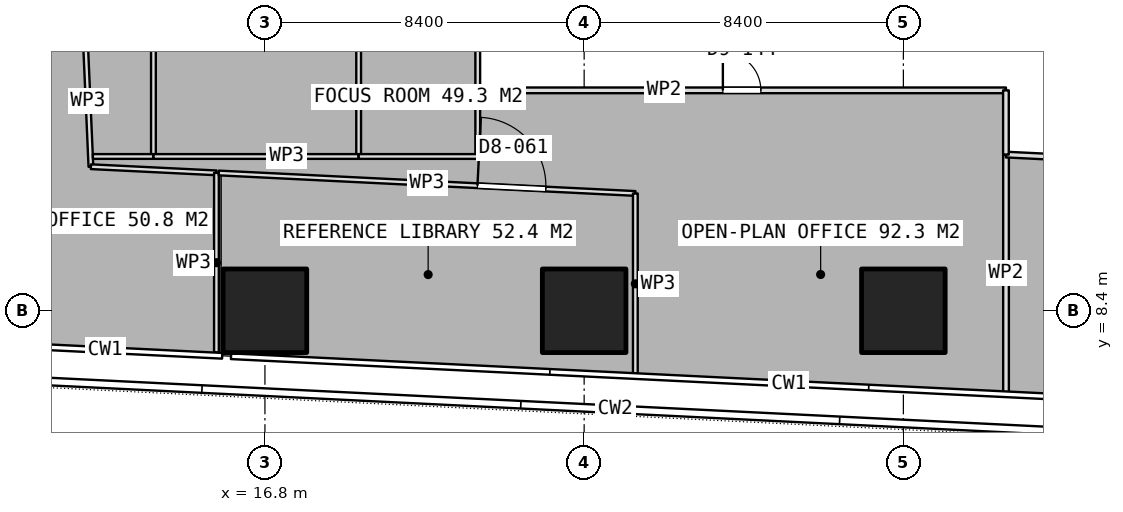
"""IFC4 building model, lengths in metres.
Left out: names, types, materials, properties, quantities, classifications, styles, units other than length and angle.
Written with IfcOpenShell. Run it as: python <this file> out.ifc"""

import sys

from ifc_helpers import new_model, si_unit, direction, frame, frame_2d, origin, origin_2d, place, context, subcontext, project, spatial, rectangle, extrude, element, fill, save


model = new_model("IFC4")
c1 = context("Model", 3, precision=1e-05, world=origin(), true_north=direction((0.0, 1.0)))
c2 = subcontext(c1, "Body", "Model", "MODEL_VIEW")
j1 = project(units=[si_unit("LENGTHUNIT", "METRE"), si_unit("PLANEANGLEUNIT", "RADIAN")], contexts=[c1])
p1 = place(None, origin())
s1 = spatial("IfcSite", under=j1, at=p1, CompositionType="ELEMENT")
p2 = place(p1, origin())
s2 = spatial("IfcBuilding", under=s1, at=p2, CompositionType="ELEMENT")
p3 = place(p2, frame((0.0, 0.0, 51.65)))
s3 = spatial("IfcBuildingStorey", under=s2, at=p3, CompositionType="ELEMENT", Elevation=51.65)
for number, where, z_axis, x_axis in (
    (1, (16.8, 8.4, 0.0), (0.0, 0.0, 1.0), (1.0, 0.0, 0.0)),
    (2, (25.2, 8.4, 0.0), (0.0, 0.0, 1.0), (1.0, 0.0, 0.0)),
    (3, (33.6, 8.4, 0.0), (0.0, 0.0, 1.0), (1.0, 0.0, 0.0)),
):
    element("IfcColumn", number, at=place(p3, frame(where, z_axis=z_axis, x_axis=x_axis)), inside=s3, PredefinedType="COLUMN", context=c2, shape_type="SweptSolid", body=[
        extrude(rectangle(XDim=2.2, YDim=2.2, at=origin_2d()), origin(), (0.0, 0.0, 1.0), 3.75),
    ])
p4 = place(p3, frame((36.301, 6.253, 0.0), z_axis=(0.0, 0.0, 1.0), x_axis=(0.0, 1.0, 0.0)))
e4 = element("IfcWall", 4, at=p4, inside=s3, PredefinedType="PARTITIONING", context=c2, shape_type="SweptSolid", body=[
    extrude(rectangle(XDim=6.257, YDim=0.15, at=frame_2d((3.128, 0.0))), origin(), (0.0, 0.0, 1.0), 3.5),
])
p5 = place(p3, frame((36.301, 12.51, 0.0), z_axis=(0.0, 0.0, 1.0), x_axis=(0.998801323594, -0.048948094823, 0.0)))
e5 = element("IfcWall", 5, at=p5, inside=s3, PredefinedType="PARTITIONING", context=c2, shape_type="SweptSolid", body=[
    extrude(rectangle(XDim=3.003, YDim=0.15, at=frame_2d((1.501, 0.0))), origin(), (0.0, 0.0, 1.0), 3.5),
])
p6 = place(p3, frame((12.07, 15.643, 0.0), z_axis=(0.0, 0.0, 1.0), x_axis=(0.043664115519, -0.999046267705, 0.0)))
e6 = element("IfcWall", 6, at=p6, inside=s3, PredefinedType="PARTITIONING", context=c2, shape_type="SweptSolid", body=[
    extrude(rectangle(XDim=3.455, YDim=0.125, at=frame_2d((1.728, 0.0))), origin(), (0.0, 0.0, 1.0), 3.5),
])
p7 = place(p3, frame((12.221, 12.191, 0.0), z_axis=(0.0, 0.0, 1.0), x_axis=(0.998801372368, -0.048947099555, 0.0)))
e7 = element("IfcWall", 7, at=p7, inside=s3, PredefinedType="PARTITIONING", context=c2, shape_type="SweptSolid", body=[
    extrude(rectangle(XDim=3.307, YDim=0.125, at=frame_2d((1.653, 0.0))), origin(), (0.0, 0.0, 1.0), 3.5),
])
p8 = place(p3, frame((15.524, 12.029, 0.0), z_axis=(0.0, 0.0, 1.0), x_axis=(0.0, -1.0, 0.0)))
e8 = element("IfcWall", 8, at=p8, inside=s3, PredefinedType="PARTITIONING", context=c2, shape_type="SweptSolid", body=[
    extrude(rectangle(XDim=4.726, YDim=0.125, at=frame_2d((2.363, 0.0))), origin(), (0.0, 0.0, 1.0), 3.5),
])
p9 = place(p3, frame((15.586, 12.026, 0.0), z_axis=(0.0, 0.0, 1.0), x_axis=(0.998793981911, -0.04909767508, 0.0)))
e9 = element("IfcWall", 9, at=p9, inside=s3, PredefinedType="PARTITIONING", context=c2, shape_type="SweptSolid", body=[
    extrude(rectangle(XDim=10.974, YDim=0.125, at=frame_2d((5.487, 0.0))), origin(), (0.0, 0.0, 1.0), 3.5),
])
p10 = place(p9, frame((6.815, 0.0, 0.0)))
e10 = element("IfcOpeningElement", 10, at=p10, cuts=e9, PredefinedType="OPENING", context=c2, shape_type="SweptSolid", body=[
    extrude(rectangle(XDim=1.8, YDim=2.1, at=frame_2d((0.9, 1.05))), frame((0.0, 0.073, 0.0), z_axis=(0.0, -1.0, 0.0), x_axis=(1.0, 0.0, 0.0)), (0.0, 0.0, 1.0), 0.145),
])
p11 = place(p3, frame((26.547, 11.487, 0.0), z_axis=(0.0, 0.0, 1.0), x_axis=(0.0, -1.0, 0.0)))
e11 = element("IfcWall", 11, at=p11, inside=s3, PredefinedType="PARTITIONING", context=c2, shape_type="SweptSolid", body=[
    extrude(rectangle(XDim=4.755, YDim=0.125, at=frame_2d((2.377, 0.0))), origin(), (0.0, 0.0, 1.0), 3.5),
])
p12 = place(p3, frame((13.866, 28.2, 0.0), z_axis=(0.0, 0.0, 1.0), x_axis=(0.0, -1.0, 0.0)))
e12 = element("IfcWall", 12, at=p12, inside=s3, PredefinedType="PARTITIONING", context=c2, shape_type="SweptSolid", body=[
    extrude(rectangle(XDim=15.74, YDim=0.125, at=frame_2d((7.87, 0.0))), origin(), (0.0, 0.0, 1.0), 3.5),
])
p13 = place(p3, frame((13.866, 12.46, 0.0), z_axis=(0.0, 0.0, 1.0), x_axis=(-1.0, 0.0, 0.0)))
e13 = element("IfcWall", 13, at=p13, inside=s3, PredefinedType="PARTITIONING", context=c2, shape_type="SweptSolid", body=[
    extrude(rectangle(XDim=1.594, YDim=0.125, at=frame_2d((0.797, 0.0))), origin(), (0.0, 0.0, 1.0), 3.5),
])
p14 = place(p3, frame((19.266, 28.2, 0.0), z_axis=(0.0, 0.0, 1.0), x_axis=(0.0, -1.0, 0.0)))
e14 = element("IfcWall", 14, at=p14, inside=s3, PredefinedType="PARTITIONING", context=c2, shape_type="SweptSolid", body=[
    extrude(rectangle(XDim=15.74, YDim=0.125, at=frame_2d((7.87, 0.0))), origin(), (0.0, 0.0, 1.0), 3.5),
])
p15 = place(p3, frame((19.266, 12.46, 0.0), z_axis=(0.0, 0.0, 1.0), x_axis=(-1.0, 0.0, 0.0)))
e15 = element("IfcWall", 15, at=p15, inside=s3, PredefinedType="PARTITIONING", context=c2, shape_type="SweptSolid", body=[
    extrude(rectangle(XDim=5.4, YDim=0.125, at=frame_2d((2.7, 0.0))), origin(), (0.0, 0.0, 1.0), 3.5),
])
p16 = place(p3, frame((22.4, 28.2, 0.0), z_axis=(0.0, 0.0, 1.0), x_axis=(0.0, -1.0, 0.0)))
e16 = element("IfcWall", 16, at=p16, inside=s3, PredefinedType="PARTITIONING", context=c2, shape_type="SweptSolid", body=[
    extrude(rectangle(XDim=15.74, YDim=0.125, at=frame_2d((7.87, 0.0))), origin(), (0.0, 0.0, 1.0), 3.5),
])
p17 = place(p16, frame((6.97, 0.0, 0.0)))
e17 = element("IfcOpeningElement", 17, at=p17, cuts=e16, PredefinedType="OPENING", context=c2, shape_type="SweptSolid", body=[
    extrude(rectangle(XDim=1.8, YDim=2.1, at=frame_2d((0.9, 1.05))), frame((0.0, 0.073, 0.0), z_axis=(0.0, -1.0, 0.0), x_axis=(1.0, 0.0, 0.0)), (0.0, 0.0, 1.0), 0.145),
])
p18 = place(p3, frame((22.4, 12.46, 0.0), z_axis=(0.0, 0.0, 1.0), x_axis=(-1.0, 0.0, 0.0)))
e18 = element("IfcWall", 18, at=p18, inside=s3, PredefinedType="PARTITIONING", context=c2, shape_type="SweptSolid", body=[
    extrude(rectangle(XDim=3.134, YDim=0.125, at=frame_2d((1.567, 0.0))), origin(), (0.0, 0.0, 1.0), 3.5),
])
p19 = place(p3, frame((22.462, 14.2, 0.0), z_axis=(0.0, 0.0, 1.0), x_axis=(1.0, 0.0, 0.0)))
e19 = element("IfcWall", 19, at=p19, inside=s3, PredefinedType="PARTITIONING", context=c2, shape_type="SweptSolid", body=[
    extrude(rectangle(XDim=13.837, YDim=0.15, at=frame_2d((6.918, 0.0))), origin(), (0.0, 0.0, 1.0), 3.5),
])
p20 = place(p19, frame((6.388, 0.0, 0.0)))
e20 = element("IfcOpeningElement", 20, at=p20, cuts=e19, PredefinedType="OPENING", context=c2, shape_type="SweptSolid", body=[
    extrude(rectangle(XDim=1.0, YDim=2.1, at=frame_2d((0.5, 1.05))), frame((0.0, 0.085, 0.0), z_axis=(0.0, -1.0, 0.0), x_axis=(1.0, 0.0, 0.0)), (0.0, 0.0, 1.0), 0.17),
])
p21 = place(p3, frame((36.299, 14.2, 0.0), z_axis=(0.0, 0.0, 1.0), x_axis=(0.0, -1.0, 0.0)))
e21 = element("IfcWall", 21, at=p21, inside=s3, PredefinedType="PARTITIONING", context=c2, shape_type="SweptSolid", body=[
    extrude(rectangle(XDim=1.69, YDim=0.15, at=frame_2d((0.845, 0.0))), origin(), (0.0, 0.0, 1.0), 3.5),
])
p22 = place(p10, origin())
e22 = element("IfcDoor", 22, at=p22, inside=s3, OperationType="DOUBLE_DOOR_SINGLE_SWING", PredefinedType="DOOR", context=c2, shape_type="SweptSolid", body=[
    extrude(rectangle(XDim=1.8, YDim=2.1, at=frame_2d((0.9, 1.05))), frame((0.0, 0.025, 0.0), z_axis=(0.0, -1.0, 0.0), x_axis=(1.0, 0.0, 0.0)), (0.0, 0.0, 1.0), 0.05),
])
fill(e10, e22)
p23 = place(p20, origin())
e23 = element("IfcDoor", 23, at=p23, inside=s3, OperationType="SINGLE_SWING_LEFT", PredefinedType="DOOR", context=c2, shape_type="SweptSolid", body=[
    extrude(rectangle(XDim=1.0, YDim=2.1, at=frame_2d((0.5, 1.05))), frame((0.0, 0.025, 0.0), z_axis=(0.0, -1.0, 0.0), x_axis=(1.0, 0.0, 0.0)), (0.0, 0.0, 1.0), 0.05),
])
fill(e20, e23)
save(model, sys.argv[1])
